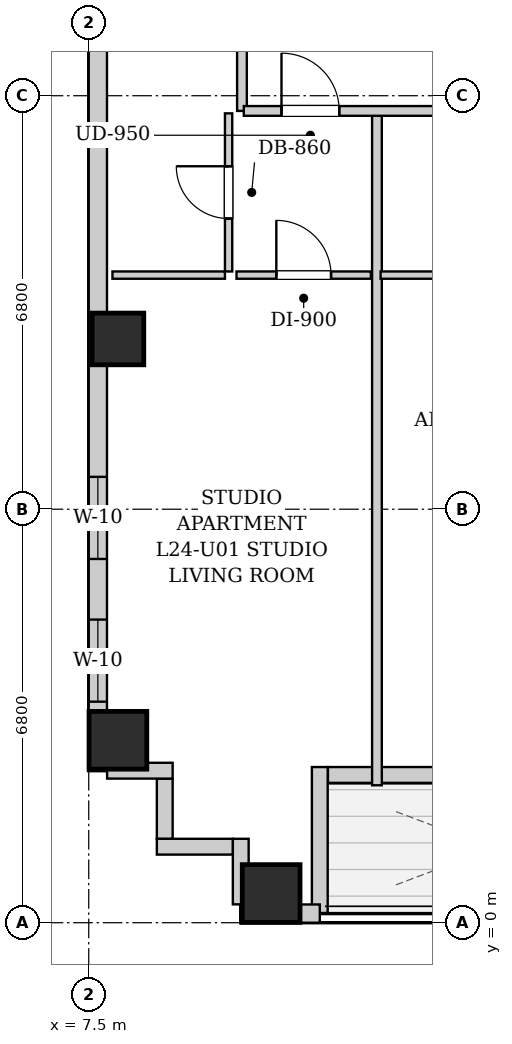
"""IFC4 building model, lengths in metres.
Left out: names, types, materials, properties, quantities, classifications, styles, units other than length and angle.
Written with IfcOpenShell. Run it as: python <this file> out.ifc"""

import sys

from ifc_helpers import new_model, si_unit, direction, frame, frame_2d, origin, origin_2d, place, context, subcontext, project, spatial, rectangle, extrude, element, fill, save


model = new_model("IFC4")
c1 = context("Model", 3, precision=1e-05, world=origin(), true_north=direction((0.0, 1.0)))
c2 = subcontext(c1, "Body", "Model", "MODEL_VIEW")
j1 = project(units=[si_unit("LENGTHUNIT", "METRE"), si_unit("PLANEANGLEUNIT", "RADIAN")], contexts=[c1])
p1 = place(None, origin())
s1 = spatial("IfcSite", under=j1, at=p1, CompositionType="ELEMENT")
p2 = place(p1, origin())
s2 = spatial("IfcBuilding", under=s1, at=p2, CompositionType="ELEMENT")
p3 = place(p2, frame((0.0, 0.0, 87.9)))
s3 = spatial("IfcBuildingStorey", under=s2, at=p3, CompositionType="ELEMENT", Elevation=87.9)
for number, where, z_axis, x_axis in (
    (1, (10.5, 0.48, 0.0), (0.0, 0.0, 1.0), (1.0, 0.0, 0.0)),
    (2, (7.98, 3.0, 0.0), (0.0, 0.0, 1.0), (1.0, 0.0, 0.0)),
):
    element("IfcColumn", number, at=place(p3, frame(where, z_axis=z_axis, x_axis=x_axis)), inside=s3, PredefinedType="COLUMN", context=c2, shape_type="SweptSolid", body=[
        extrude(rectangle(XDim=0.95, YDim=0.95, at=origin_2d()), origin(), (0.0, 0.0, 1.0), 3.2),
    ])
p4 = place(p3, frame((7.98, 9.6, 0.0), z_axis=(0.0, 0.0, 1.0), x_axis=(1.0, 0.0, 0.0)))
e3 = element("IfcColumn", 3, at=p4, inside=s3, PredefinedType="COLUMN", context=c2, shape_type="SweptSolid", body=[
    extrude(rectangle(XDim=0.85, YDim=0.85, at=origin_2d()), origin(), (0.0, 0.0, 1.0), 3.2),
])
p5 = place(p3, frame((16.866, 2.43, 0.0), z_axis=(0.0, 0.0, 1.0), x_axis=(-1.0, 0.0, 0.0)))
e4 = element("IfcWall", 4, at=p5, inside=s3, PredefinedType="SOLIDWALL", context=c2, shape_type="SweptSolid", body=[
    extrude(rectangle(XDim=5.432, YDim=0.26, at=frame_2d((2.716, 0.0))), origin(), (0.0, 0.0, 1.0), 2.94),
])
p6 = place(p5, frame((2.166, 0.0, 0.0)))
e5 = element("IfcOpeningElement", 5, at=p6, cuts=e4, PredefinedType="OPENING", context=c2, shape_type="SweptSolid", body=[
    extrude(rectangle(XDim=1.1, YDim=2.0, at=frame_2d((0.55, 1.0))), frame((0.0, 0.14, 0.0), z_axis=(0.0, -1.0, 0.0), x_axis=(1.0, 0.0, 0.0)), (0.0, 0.0, 1.0), 0.28),
])
p7 = place(p5, frame((0.556, 0.0, 0.85)))
e6 = element("IfcOpeningElement", 6, at=p7, cuts=e4, PredefinedType="OPENING", context=c2, shape_type="SweptSolid", body=[
    extrude(rectangle(XDim=1.35, YDim=1.65, at=frame_2d((0.675, 0.825))), frame((0.0, 0.14, 0.0), z_axis=(0.0, -1.0, 0.0), x_axis=(1.0, 0.0, 0.0)), (0.0, 0.0, 1.0), 0.28),
])
p8 = place(p3, frame((11.3, 2.56, 0.0), z_axis=(0.0, 0.0, 1.0), x_axis=(0.0, -1.0, 0.0)))
e7 = element("IfcWall", 7, at=p8, inside=s3, PredefinedType="SOLIDWALL", context=c2, shape_type="SweptSolid", body=[
    extrude(rectangle(XDim=2.4, YDim=0.26, at=frame_2d((1.2, 0.0))), origin(), (0.0, 0.0, 1.0), 2.94),
])
p9 = place(p3, frame((11.3, 0.15, 0.0), z_axis=(0.0, 0.0, 1.0), x_axis=(-1.0, 0.0, 0.0)))
e8 = element("IfcWall", 8, at=p9, inside=s3, PredefinedType="SOLIDWALL", context=c2, shape_type="SweptSolid", body=[
    extrude(rectangle(XDim=1.3, YDim=0.3, at=frame_2d((0.65, 0.0))), origin(), (0.0, 0.0, 1.0), 2.94),
])
p10 = place(p3, frame((7.65, 2.5, 0.0), z_axis=(0.0, 0.0, 1.0), x_axis=(0.0, 1.0, 0.0)))
e9 = element("IfcWall", 9, at=p10, inside=s3, PredefinedType="SOLIDWALL", context=c2, shape_type="SweptSolid", body=[
    extrude(rectangle(XDim=12.7, YDim=0.3, at=frame_2d((6.35, 0.0))), origin(), (0.0, 0.0, 1.0), 2.94),
])
p11 = place(p10, frame((3.482, 0.0, 0.55)))
e10 = element("IfcOpeningElement", 10, at=p11, cuts=e9, PredefinedType="OPENING", context=c2, shape_type="SweptSolid", body=[
    extrude(rectangle(XDim=1.35, YDim=1.2, at=frame_2d((0.675, 0.6))), frame((0.0, 0.16, 0.0), z_axis=(0.0, -1.0, 0.0), x_axis=(1.0, 0.0, 0.0)), (0.0, 0.0, 1.0), 0.32),
])
p12 = place(p10, frame((1.135, 0.0, 0.55)))
e11 = element("IfcOpeningElement", 11, at=p12, cuts=e9, PredefinedType="OPENING", context=c2, shape_type="SweptSolid", body=[
    extrude(rectangle(XDim=1.35, YDim=1.2, at=frame_2d((0.675, 0.6))), frame((0.0, 0.16, 0.0), z_axis=(0.0, -1.0, 0.0), x_axis=(1.0, 0.0, 0.0)), (0.0, 0.0, 1.0), 0.32),
])
p13 = place(p3, frame((10.0, 0.302, 0.0), z_axis=(0.0, 0.0, 1.0), x_axis=(0.0, 1.0, 0.0)))
e12 = element("IfcWall", 12, at=p13, inside=s3, PredefinedType="SOLIDWALL", context=c2, shape_type="SweptSolid", body=[
    extrude(rectangle(XDim=1.078, YDim=0.26, at=frame_2d((0.539, 0.0))), origin(), (0.0, 0.0, 1.0), 2.94),
])
p14 = place(p3, frame((9.868, 1.25, 0.0), z_axis=(0.0, 0.0, 1.0), x_axis=(-1.0, 0.0, 0.0)))
e13 = element("IfcWall", 13, at=p14, inside=s3, PredefinedType="SOLIDWALL", context=c2, shape_type="SweptSolid", body=[
    extrude(rectangle(XDim=1.248, YDim=0.26, at=frame_2d((0.624, 0.0))), origin(), (0.0, 0.0, 1.0), 2.94),
])
p15 = place(p3, frame((8.75, 1.382, 0.0), z_axis=(0.0, 0.0, 1.0), x_axis=(0.0, 1.0, 0.0)))
e14 = element("IfcWall", 14, at=p15, inside=s3, PredefinedType="SOLIDWALL", context=c2, shape_type="SweptSolid", body=[
    extrude(rectangle(XDim=0.986, YDim=0.26, at=frame_2d((0.493, 0.0))), origin(), (0.0, 0.0, 1.0), 2.94),
])
p16 = place(p3, frame((8.88, 2.5, 0.0), z_axis=(0.0, 0.0, 1.0), x_axis=(-1.0, 0.0, 0.0)))
e15 = element("IfcWall", 15, at=p16, inside=s3, PredefinedType="SOLIDWALL", context=c2, shape_type="SweptSolid", body=[
    extrude(rectangle(XDim=1.078, YDim=0.26, at=frame_2d((0.539, 0.0))), origin(), (0.0, 0.0, 1.0), 2.94),
])
p17 = place(p3, frame((10.02, 13.35, 0.0), z_axis=(0.0, 0.0, 1.0), x_axis=(0.0, 1.0, 0.0)))
e16 = element("IfcWall", 16, at=p17, inside=s3, PredefinedType="PARTITIONING", context=c2, shape_type="SweptSolid", body=[
    extrude(rectangle(XDim=1.74, YDim=0.16, at=frame_2d((0.87, 0.0))), origin(), (0.0, 0.0, 1.0), 2.94),
])
p18 = place(p3, frame((9.8, 10.71, 0.0), z_axis=(0.0, 0.0, 1.0), x_axis=(0.0, 1.0, 0.0)))
e17 = element("IfcWall", 17, at=p18, inside=s3, PredefinedType="PARTITIONING", context=c2, shape_type="SweptSolid", body=[
    extrude(rectangle(XDim=2.6, YDim=0.12, at=frame_2d((1.3, 0.0))), origin(), (0.0, 0.0, 1.0), 2.94),
])
p19 = place(p18, frame((0.87, 0.0, 0.0)))
e18 = element("IfcOpeningElement", 18, at=p19, cuts=e17, PredefinedType="OPENING", context=c2, shape_type="SweptSolid", body=[
    extrude(rectangle(XDim=0.86, YDim=2.05, at=frame_2d((0.43, 1.025))), frame((0.0, 0.07, 0.0), z_axis=(0.0, -1.0, 0.0), x_axis=(1.0, 0.0, 0.0)), (0.0, 0.0, 1.0), 0.14),
])
p20 = place(p3, frame((7.89, 10.65, 0.0), z_axis=(0.0, 0.0, 1.0), x_axis=(1.0, 0.0, 0.0)))
e19 = element("IfcWall", 19, at=p20, inside=s3, PredefinedType="PARTITIONING", context=c2, shape_type="SweptSolid", body=[
    extrude(rectangle(XDim=1.85, YDim=0.12, at=frame_2d((0.925, 0.0))), origin(), (0.0, 0.0, 1.0), 2.94),
])
p21 = place(p3, frame((9.93, 10.65, 0.0), z_axis=(0.0, 0.0, 1.0), x_axis=(1.0, 0.0, 0.0)))
e20 = element("IfcWall", 20, at=p21, inside=s3, PredefinedType="PARTITIONING", context=c2, shape_type="SweptSolid", body=[
    extrude(rectangle(XDim=2.21, YDim=0.12, at=frame_2d((1.105, 0.0))), origin(), (0.0, 0.0, 1.0), 2.94),
])
p22 = place(p21, frame((0.655, 0.0, 0.0)))
e21 = element("IfcOpeningElement", 21, at=p22, cuts=e20, PredefinedType="OPENING", context=c2, shape_type="SweptSolid", body=[
    extrude(rectangle(XDim=0.9, YDim=2.05, at=frame_2d((0.45, 1.025))), frame((0.0, 0.07, 0.0), z_axis=(0.0, -1.0, 0.0), x_axis=(1.0, 0.0, 0.0)), (0.0, 0.0, 1.0), 0.14),
])
p23 = place(p3, frame((12.24, 2.26, 0.0), z_axis=(0.0, 0.0, 1.0), x_axis=(0.0, 1.0, 0.0)))
e22 = element("IfcWall", 22, at=p23, inside=s3, PredefinedType="PARTITIONING", context=c2, shape_type="SweptSolid", body=[
    extrude(rectangle(XDim=11.05, YDim=0.16, at=frame_2d((5.525, 0.0))), origin(), (0.0, 0.0, 1.0), 2.94),
])
p24 = place(p3, frame((12.3, 10.65, 0.0), z_axis=(0.0, 0.0, 1.0), x_axis=(1.0, 0.0, 0.0)))
e23 = element("IfcWall", 23, at=p24, inside=s3, PredefinedType="PARTITIONING", context=c2, shape_type="SweptSolid", body=[
    extrude(rectangle(XDim=2.4, YDim=0.12, at=frame_2d((1.2, 0.0))), origin(), (0.0, 0.0, 1.0), 2.94),
])
p25 = place(p3, frame((10.05, 13.35, 0.0), z_axis=(0.0, 0.0, 1.0), x_axis=(1.0, 0.0, 0.0)))
e24 = element("IfcWall", 24, at=p25, inside=s3, PredefinedType="PARTITIONING", context=c2, shape_type="SweptSolid", body=[
    extrude(rectangle(XDim=30.8, YDim=0.16, at=frame_2d((15.4, 0.0))), origin(), (0.0, 0.0, 1.0), 2.94),
])
p26 = place(p25, frame((0.62, 0.0, 0.0)))
e25 = element("IfcOpeningElement", 25, at=p26, cuts=e24, PredefinedType="OPENING", context=c2, shape_type="SweptSolid", body=[
    extrude(rectangle(XDim=0.95, YDim=2.1, at=frame_2d((0.475, 1.05))), frame((0.0, 0.09, 0.0), z_axis=(0.0, -1.0, 0.0), x_axis=(1.0, 0.0, 0.0)), (0.0, 0.0, 1.0), 0.18),
])
p27 = place(p25, frame((6.115, 0.0, 0.0)))
e26 = element("IfcOpeningElement", 26, at=p27, cuts=e24, PredefinedType="OPENING", context=c2, shape_type="SweptSolid", body=[
    extrude(rectangle(XDim=0.95, YDim=2.1, at=frame_2d((0.475, 1.05))), frame((0.0, 0.09, 0.0), z_axis=(0.0, -1.0, 0.0), x_axis=(1.0, 0.0, 0.0)), (0.0, 0.0, 1.0), 0.18),
])
p28 = place(p25, frame((17.056, 0.0, 0.0)))
e27 = element("IfcOpeningElement", 27, at=p28, cuts=e24, PredefinedType="OPENING", context=c2, shape_type="SweptSolid", body=[
    extrude(rectangle(XDim=0.95, YDim=2.1, at=frame_2d((0.475, 1.05))), frame((0.0, 0.09, 0.0), z_axis=(0.0, -1.0, 0.0), x_axis=(1.0, 0.0, 0.0)), (0.0, 0.0, 1.0), 0.18),
])
p29 = place(p25, frame((24.025, 0.0, 0.0)))
e28 = element("IfcOpeningElement", 28, at=p29, cuts=e24, PredefinedType="OPENING", context=c2, shape_type="SweptSolid", body=[
    extrude(rectangle(XDim=0.95, YDim=2.1, at=frame_2d((0.475, 1.05))), frame((0.0, 0.09, 0.0), z_axis=(0.0, -1.0, 0.0), x_axis=(1.0, 0.0, 0.0)), (0.0, 0.0, 1.0), 0.18),
])
p30 = place(p19, origin())
e29 = element("IfcDoor", 29, at=p30, inside=s3, OperationType="SINGLE_SWING_RIGHT", PredefinedType="DOOR", context=c2, shape_type="SweptSolid", body=[
    extrude(rectangle(XDim=0.86, YDim=2.05, at=frame_2d((0.43, 1.025))), frame((0.0, 0.025, 0.0), z_axis=(0.0, -1.0, 0.0), x_axis=(1.0, 0.0, 0.0)), (0.0, 0.0, 1.0), 0.05),
])
fill(e18, e29)
p31 = place(p22, origin())
e30 = element("IfcDoor", 30, at=p31, inside=s3, OperationType="SINGLE_SWING_LEFT", PredefinedType="DOOR", context=c2, shape_type="SweptSolid", body=[
    extrude(rectangle(XDim=0.9, YDim=2.05, at=frame_2d((0.45, 1.025))), frame((0.0, 0.025, 0.0), z_axis=(0.0, -1.0, 0.0), x_axis=(1.0, 0.0, 0.0)), (0.0, 0.0, 1.0), 0.05),
])
fill(e21, e30)
p32 = place(p26, origin())
e31 = element("IfcDoor", 31, at=p32, inside=s3, OperationType="SINGLE_SWING_LEFT", PredefinedType="DOOR", context=c2, shape_type="SweptSolid", body=[
    extrude(rectangle(XDim=0.95, YDim=2.1, at=frame_2d((0.475, 1.05))), frame((0.0, 0.025, 0.0), z_axis=(0.0, -1.0, 0.0), x_axis=(1.0, 0.0, 0.0)), (0.0, 0.0, 1.0), 0.05),
])
fill(e25, e31)
p33 = place(p11, origin())
e32 = element("IfcWindow", 32, at=p33, inside=s3, PartitioningType="SINGLE_PANEL", PredefinedType="WINDOW", context=c2, shape_type="SweptSolid", body=[
    extrude(rectangle(XDim=1.35, YDim=1.2, at=frame_2d((0.675, 0.6))), frame((0.0, 0.03, 0.0), z_axis=(0.0, -1.0, 0.0), x_axis=(1.0, 0.0, 0.0)), (0.0, 0.0, 1.0), 0.06),
])
fill(e10, e32)
p34 = place(p12, origin())
e33 = element("IfcWindow", 33, at=p34, inside=s3, PartitioningType="SINGLE_PANEL", PredefinedType="WINDOW", context=c2, shape_type="SweptSolid", body=[
    extrude(rectangle(XDim=1.35, YDim=1.2, at=frame_2d((0.675, 0.6))), frame((0.0, 0.03, 0.0), z_axis=(0.0, -1.0, 0.0), x_axis=(1.0, 0.0, 0.0)), (0.0, 0.0, 1.0), 0.06),
])
fill(e11, e33)
save(model, sys.argv[1])
